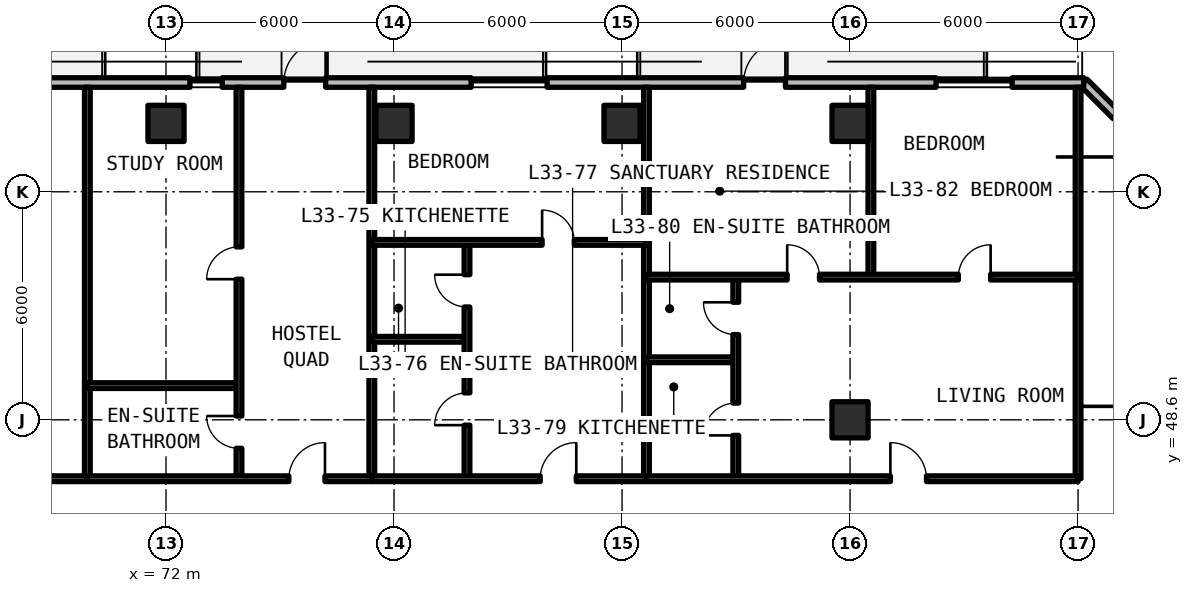
"""IFC4 building model, lengths in metres.
Left out: names, types, materials, properties, quantities, classifications, styles, units other than length and angle.
Written with IfcOpenShell. Run it as: python <this file> out.ifc"""

import sys

from ifc_helpers import new_model, si_unit, direction, frame, frame_2d, origin, origin_2d, place, context, subcontext, project, spatial, rectangle, extrude, element, fill, save


model = new_model("IFC4")
c1 = context("Model", 3, precision=1e-05, world=origin(), true_north=direction((0.0, 1.0)))
c2 = subcontext(c1, "Body", "Model", "MODEL_VIEW")
j1 = project(units=[si_unit("LENGTHUNIT", "METRE"), si_unit("PLANEANGLEUNIT", "RADIAN")], contexts=[c1])
p1 = place(None, origin())
s1 = spatial("IfcSite", under=j1, at=p1, CompositionType="ELEMENT")
p2 = place(p1, origin())
s2 = spatial("IfcBuilding", under=s1, at=p2, CompositionType="ELEMENT")
p3 = place(p2, frame((0.0, 0.0, 119.46)))
s3 = spatial("IfcBuildingStorey", under=s2, at=p3, CompositionType="ELEMENT", Elevation=119.46)
for number, where, z_axis, x_axis in (
    (1, (90.0, 48.6, 0.0), (0.0, 0.0, 1.0), (1.0, 0.0, 0.0)),
    (2, (72.0, 56.4, 0.0), (0.0, 0.0, 1.0), (1.0, 0.0, 0.0)),
    (3, (78.0, 56.4, 0.0), (0.0, 0.0, 1.0), (1.0, 0.0, 0.0)),
    (4, (84.0, 56.4, 0.0), (0.0, 0.0, 1.0), (1.0, 0.0, 0.0)),
    (5, (90.0, 56.4, 0.0), (0.0, 0.0, 1.0), (1.0, 0.0, 0.0)),
):
    element("IfcColumn", number, at=place(p3, frame(where, z_axis=z_axis, x_axis=x_axis)), inside=s3, PredefinedType="COLUMN", context=c2, shape_type="SweptSolid", body=[
        extrude(rectangle(XDim=0.95, YDim=0.95, at=origin_2d()), origin(), (0.0, 0.0, 1.0), 3.63),
    ])
p4 = place(p3, frame((100.275, 53.348, 0.0), z_axis=(0.0, 0.0, 1.0), x_axis=(-0.70708586489, 0.707127696864, 0.0)))
e6 = element("IfcWall", 6, at=p4, inside=s3, PredefinedType="SOLIDWALL", context=c2, shape_type="SweptSolid", body=[
    extrude(rectangle(XDim=5.836, YDim=0.25, at=frame_2d((2.918, 0.0))), origin(), (0.0, 0.0, 1.0), 3.35),
])
p5 = place(p4, frame((1.218, 0.0, 0.78)))
e7 = element("IfcOpeningElement", 7, at=p5, cuts=e6, PredefinedType="OPENING", context=c2, shape_type="SweptSolid", body=[
    extrude(rectangle(XDim=3.4, YDim=1.66, at=frame_2d((1.7, 0.83))), frame((0.0, 0.135, 0.0), z_axis=(0.0, -1.0, 0.0), x_axis=(1.0, 0.0, 0.0)), (0.0, 0.0, 1.0), 0.27),
])
p6 = place(p3, frame((96.148, 57.475, 0.0), z_axis=(0.0, 0.0, 1.0), x_axis=(-1.0, 0.0, 0.0)))
e8 = element("IfcWall", 8, at=p6, inside=s3, PredefinedType="SOLIDWALL", context=c2, shape_type="SweptSolid", body=[
    extrude(rectangle(XDim=44.023, YDim=0.25, at=frame_2d((22.012, 0.0))), origin(), (0.0, 0.0, 1.0), 3.35),
])
p7 = place(p6, frame((32.048, 0.0, 0.0)))
e9 = element("IfcOpeningElement", 9, at=p7, cuts=e8, PredefinedType="OPENING", context=c2, shape_type="SweptSolid", body=[
    extrude(rectangle(XDim=1.1, YDim=2.15, at=frame_2d((0.55, 1.075))), frame((0.0, 0.135, 0.0), z_axis=(0.0, -1.0, 0.0), x_axis=(1.0, 0.0, 0.0)), (0.0, 0.0, 1.0), 0.27),
])
p8 = place(p6, frame((19.948, 0.0, 0.0)))
e10 = element("IfcOpeningElement", 10, at=p8, cuts=e8, PredefinedType="OPENING", context=c2, shape_type="SweptSolid", body=[
    extrude(rectangle(XDim=1.1, YDim=2.15, at=frame_2d((0.55, 1.075))), frame((0.0, 0.135, 0.0), z_axis=(0.0, -1.0, 0.0), x_axis=(1.0, 0.0, 0.0)), (0.0, 0.0, 1.0), 0.27),
])
p9 = place(p6, frame((7.848, 0.0, 0.0)))
e11 = element("IfcOpeningElement", 11, at=p9, cuts=e8, PredefinedType="OPENING", context=c2, shape_type="SweptSolid", body=[
    extrude(rectangle(XDim=1.1, YDim=2.15, at=frame_2d((0.55, 1.075))), frame((0.0, 0.135, 0.0), z_axis=(0.0, -1.0, 0.0), x_axis=(1.0, 0.0, 0.0)), (0.0, 0.0, 1.0), 0.27),
])
p10 = place(p6, frame((38.769, 0.0, 0.78)))
e12 = element("IfcOpeningElement", 12, at=p10, cuts=e8, PredefinedType="OPENING", context=c2, shape_type="SweptSolid", body=[
    extrude(rectangle(XDim=2.0, YDim=1.66, at=frame_2d((1.0, 0.83))), frame((0.0, 0.135, 0.0), z_axis=(0.0, -1.0, 0.0), x_axis=(1.0, 0.0, 0.0)), (0.0, 0.0, 1.0), 0.27),
])
p11 = place(p6, frame((22.668, 0.0, 0.78)))
e13 = element("IfcOpeningElement", 13, at=p11, cuts=e8, PredefinedType="OPENING", context=c2, shape_type="SweptSolid", body=[
    extrude(rectangle(XDim=0.85, YDim=1.65, at=frame_2d((0.425, 0.825))), frame((0.0, 0.135, 0.0), z_axis=(0.0, -1.0, 0.0), x_axis=(1.0, 0.0, 0.0)), (0.0, 0.0, 1.0), 0.27),
])
p12 = place(p6, frame((14.119, 0.0, 0.78)))
e14 = element("IfcOpeningElement", 14, at=p12, cuts=e8, PredefinedType="OPENING", context=c2, shape_type="SweptSolid", body=[
    extrude(rectangle(XDim=2.0, YDim=1.66, at=frame_2d((1.0, 0.83))), frame((0.0, 0.135, 0.0), z_axis=(0.0, -1.0, 0.0), x_axis=(1.0, 0.0, 0.0)), (0.0, 0.0, 1.0), 0.27),
])
p13 = place(p6, frame((1.884, 0.0, 0.78)))
e15 = element("IfcOpeningElement", 15, at=p13, cuts=e8, PredefinedType="OPENING", context=c2, shape_type="SweptSolid", body=[
    extrude(rectangle(XDim=2.0, YDim=1.66, at=frame_2d((1.0, 0.83))), frame((0.0, 0.135, 0.0), z_axis=(0.0, -1.0, 0.0), x_axis=(1.0, 0.0, 0.0)), (0.0, 0.0, 1.0), 0.27),
])
for number, where, z_axis, x_axis in (
    (16, (96.0, 47.05, 0.0), (0.0, 0.0, 1.0), (0.0, 1.0, 0.0)),
    (17, (69.93, 47.05, 0.0), (0.0, 0.0, 1.0), (0.0, 1.0, 0.0)),
):
    element("IfcWall", number, at=place(p3, frame(where, z_axis=z_axis, x_axis=x_axis)), inside=s3, PredefinedType="SOLIDWALL", context=c2, shape_type="SweptSolid", body=[
        extrude(rectangle(XDim=10.3, YDim=0.15, at=frame_2d((5.15, 0.0))), origin(), (0.0, 0.0, 1.0), 2.57),
    ])
p14 = place(p3, frame((60.638, 47.05, 0.0), z_axis=(0.0, 0.0, 1.0), x_axis=(1.0, 0.0, 0.0)))
e18 = element("IfcWall", 18, at=p14, inside=s3, PredefinedType="SOLIDWALL", context=c2, shape_type="SweptSolid", body=[
    extrude(rectangle(XDim=9.292, YDim=0.15, at=frame_2d((4.646, 0.0))), origin(), (0.0, 0.0, 1.0), 2.57),
])
p15 = place(p14, frame((4.096, 0.0, 0.0)))
e19 = element("IfcOpeningElement", 19, at=p15, cuts=e18, PredefinedType="OPENING", context=c2, shape_type="SweptSolid", body=[
    extrude(rectangle(XDim=1.1, YDim=2.15, at=frame_2d((0.55, 1.075))), frame((0.0, 0.085, 0.0), z_axis=(0.0, -1.0, 0.0), x_axis=(1.0, 0.0, 0.0)), (0.0, 0.0, 1.0), 0.17),
])
p16 = place(p3, frame((77.416, 47.05, 0.0), z_axis=(0.0, 0.0, 1.0), x_axis=(0.0, 1.0, 0.0)))
e20 = element("IfcWall", 20, at=p16, inside=s3, PredefinedType="SOLIDWALL", context=c2, shape_type="SweptSolid", body=[
    extrude(rectangle(XDim=10.3, YDim=0.15, at=frame_2d((5.15, 0.0))), origin(), (0.0, 0.0, 1.0), 2.57),
])
p17 = place(p3, frame((69.93, 49.5, 0.0), z_axis=(0.0, 0.0, 1.0), x_axis=(1.0, 0.0, 0.0)))
e21 = element("IfcWall", 21, at=p17, inside=s3, PredefinedType="PARTITIONING", context=c2, shape_type="SweptSolid", body=[
    extrude(rectangle(XDim=3.99, YDim=0.15, at=frame_2d((1.995, 0.0))), origin(), (0.0, 0.0, 1.0), 2.57),
])
p18 = place(p3, frame((73.92, 47.05, 0.0), z_axis=(0.0, 0.0, 1.0), x_axis=(0.0, 1.0, 0.0)))
e22 = element("IfcWall", 22, at=p18, inside=s3, PredefinedType="PARTITIONING", context=c2, shape_type="SweptSolid", body=[
    extrude(rectangle(XDim=10.3, YDim=0.15, at=frame_2d((5.15, 0.0))), origin(), (0.0, 0.0, 1.0), 2.57),
])
p19 = place(p18, frame((0.8, 0.0, 0.0)))
e23 = element("IfcOpeningElement", 23, at=p19, cuts=e22, PredefinedType="OPENING", context=c2, shape_type="SweptSolid", body=[
    extrude(rectangle(XDim=0.85, YDim=2.1, at=frame_2d((0.425, 1.05))), frame((0.0, 0.085, 0.0), z_axis=(0.0, -1.0, 0.0), x_axis=(1.0, 0.0, 0.0)), (0.0, 0.0, 1.0), 0.17),
])
p20 = place(p18, frame((5.25, 0.0, 0.0)))
e24 = element("IfcOpeningElement", 24, at=p20, cuts=e22, PredefinedType="OPENING", context=c2, shape_type="SweptSolid", body=[
    extrude(rectangle(XDim=0.85, YDim=2.1, at=frame_2d((0.425, 1.05))), frame((0.0, 0.085, 0.0), z_axis=(0.0, -1.0, 0.0), x_axis=(1.0, 0.0, 0.0)), (0.0, 0.0, 1.0), 0.17),
])
p21 = place(p3, frame((69.93, 47.05, 0.0), z_axis=(0.0, 0.0, 1.0), x_axis=(1.0, 0.0, 0.0)))
e25 = element("IfcWall", 25, at=p21, inside=s3, PredefinedType="SOLIDWALL", context=c2, shape_type="SweptSolid", body=[
    extrude(rectangle(XDim=7.485, YDim=0.15, at=frame_2d((3.743, 0.0))), origin(), (0.0, 0.0, 1.0), 2.57),
])
p22 = place(p21, frame((5.302, 0.0, 0.0)))
e26 = element("IfcOpeningElement", 26, at=p22, cuts=e25, PredefinedType="OPENING", context=c2, shape_type="SweptSolid", body=[
    extrude(rectangle(XDim=0.95, YDim=2.15, at=frame_2d((0.475, 1.075))), frame((0.0, 0.085, 0.0), z_axis=(0.0, -1.0, 0.0), x_axis=(1.0, 0.0, 0.0)), (0.0, 0.0, 1.0), 0.17),
])
p23 = place(p3, frame((84.643, 47.05, 0.0), z_axis=(0.0, 0.0, 1.0), x_axis=(0.0, 1.0, 0.0)))
e27 = element("IfcWall", 27, at=p23, inside=s3, PredefinedType="SOLIDWALL", context=c2, shape_type="SweptSolid", body=[
    extrude(rectangle(XDim=10.3, YDim=0.15, at=frame_2d((5.15, 0.0))), origin(), (0.0, 0.0, 1.0), 2.57),
])
p24 = place(p3, frame((77.416, 50.719, 0.0), z_axis=(0.0, 0.0, 1.0), x_axis=(1.0, 0.0, 0.0)))
e28 = element("IfcWall", 28, at=p24, inside=s3, PredefinedType="PARTITIONING", context=c2, shape_type="SweptSolid", body=[
    extrude(rectangle(XDim=2.504, YDim=0.15, at=frame_2d((1.252, 0.0))), origin(), (0.0, 0.0, 1.0), 2.57),
])
p25 = place(p3, frame((79.92, 47.05, 0.0), z_axis=(0.0, 0.0, 1.0), x_axis=(0.0, 1.0, 0.0)))
e29 = element("IfcWall", 29, at=p25, inside=s3, PredefinedType="PARTITIONING", context=c2, shape_type="SweptSolid", body=[
    extrude(rectangle(XDim=6.218, YDim=0.15, at=frame_2d((3.109, 0.0))), origin(), (0.0, 0.0, 1.0), 2.57),
])
p26 = place(p25, frame((1.409, 0.0, 0.0)))
e30 = element("IfcOpeningElement", 30, at=p26, cuts=e29, PredefinedType="OPENING", context=c2, shape_type="SweptSolid", body=[
    extrude(rectangle(XDim=0.85, YDim=2.1, at=frame_2d((0.425, 1.05))), frame((0.0, 0.085, 0.0), z_axis=(0.0, -1.0, 0.0), x_axis=(1.0, 0.0, 0.0)), (0.0, 0.0, 1.0), 0.17),
])
p27 = place(p25, frame((4.519, 0.0, 0.0)))
e31 = element("IfcOpeningElement", 31, at=p27, cuts=e29, PredefinedType="OPENING", context=c2, shape_type="SweptSolid", body=[
    extrude(rectangle(XDim=0.85, YDim=2.1, at=frame_2d((0.425, 1.05))), frame((0.0, 0.085, 0.0), z_axis=(0.0, -1.0, 0.0), x_axis=(1.0, 0.0, 0.0)), (0.0, 0.0, 1.0), 0.17),
])
p28 = place(p3, frame((77.416, 53.268, 0.0), z_axis=(0.0, 0.0, 1.0), x_axis=(1.0, 0.0, 0.0)))
e32 = element("IfcWall", 32, at=p28, inside=s3, PredefinedType="PARTITIONING", context=c2, shape_type="SweptSolid", body=[
    extrude(rectangle(XDim=7.227, YDim=0.15, at=frame_2d((3.614, 0.0))), origin(), (0.0, 0.0, 1.0), 2.57),
])
p29 = place(p28, frame((4.481, 0.0, 0.0)))
e33 = element("IfcOpeningElement", 33, at=p29, cuts=e32, PredefinedType="OPENING", context=c2, shape_type="SweptSolid", body=[
    extrude(rectangle(XDim=0.85, YDim=2.1, at=frame_2d((0.425, 1.05))), frame((0.0, 0.085, 0.0), z_axis=(0.0, -1.0, 0.0), x_axis=(1.0, 0.0, 0.0)), (0.0, 0.0, 1.0), 0.17),
])
p30 = place(p3, frame((77.416, 47.05, 0.0), z_axis=(0.0, 0.0, 1.0), x_axis=(1.0, 0.0, 0.0)))
e34 = element("IfcWall", 34, at=p30, inside=s3, PredefinedType="SOLIDWALL", context=c2, shape_type="SweptSolid", body=[
    extrude(rectangle(XDim=7.227, YDim=0.15, at=frame_2d((3.614, 0.0))), origin(), (0.0, 0.0, 1.0), 2.57),
])
p31 = place(p30, frame((4.431, 0.0, 0.0)))
e35 = element("IfcOpeningElement", 35, at=p31, cuts=e34, PredefinedType="OPENING", context=c2, shape_type="SweptSolid", body=[
    extrude(rectangle(XDim=0.95, YDim=2.15, at=frame_2d((0.475, 1.075))), frame((0.0, 0.085, 0.0), z_axis=(0.0, -1.0, 0.0), x_axis=(1.0, 0.0, 0.0)), (0.0, 0.0, 1.0), 0.17),
])
p32 = place(p3, frame((84.643, 50.18, 0.0), z_axis=(0.0, 0.0, 1.0), x_axis=(1.0, 0.0, 0.0)))
e36 = element("IfcWall", 36, at=p32, inside=s3, PredefinedType="PARTITIONING", context=c2, shape_type="SweptSolid", body=[
    extrude(rectangle(XDim=2.35, YDim=0.15, at=frame_2d((1.175, 0.0))), origin(), (0.0, 0.0, 1.0), 2.57),
])
p33 = place(p3, frame((86.993, 47.05, 0.0), z_axis=(0.0, 0.0, 1.0), x_axis=(0.0, 1.0, 0.0)))
e37 = element("IfcWall", 37, at=p33, inside=s3, PredefinedType="PARTITIONING", context=c2, shape_type="SweptSolid", body=[
    extrude(rectangle(XDim=5.305, YDim=0.15, at=frame_2d((2.652, 0.0))), origin(), (0.0, 0.0, 1.0), 2.57),
])
p34 = place(p33, frame((1.14, 0.0, 0.0)))
e38 = element("IfcOpeningElement", 38, at=p34, cuts=e37, PredefinedType="OPENING", context=c2, shape_type="SweptSolid", body=[
    extrude(rectangle(XDim=0.85, YDim=2.1, at=frame_2d((0.425, 1.05))), frame((0.0, 0.085, 0.0), z_axis=(0.0, -1.0, 0.0), x_axis=(1.0, 0.0, 0.0)), (0.0, 0.0, 1.0), 0.17),
])
p35 = place(p33, frame((3.792, 0.0, 0.0)))
e39 = element("IfcOpeningElement", 39, at=p35, cuts=e37, PredefinedType="OPENING", context=c2, shape_type="SweptSolid", body=[
    extrude(rectangle(XDim=0.85, YDim=2.1, at=frame_2d((0.425, 1.05))), frame((0.0, 0.085, 0.0), z_axis=(0.0, -1.0, 0.0), x_axis=(1.0, 0.0, 0.0)), (0.0, 0.0, 1.0), 0.17),
])
p36 = place(p3, frame((90.549, 52.355, 0.0), z_axis=(0.0, 0.0, 1.0), x_axis=(0.0, 1.0, 0.0)))
e40 = element("IfcWall", 40, at=p36, inside=s3, PredefinedType="PARTITIONING", context=c2, shape_type="SweptSolid", body=[
    extrude(rectangle(XDim=4.995, YDim=0.15, at=frame_2d((2.498, 0.0))), origin(), (0.0, 0.0, 1.0), 2.57),
])
p37 = place(p3, frame((84.643, 52.355, 0.0), z_axis=(0.0, 0.0, 1.0), x_axis=(1.0, 0.0, 0.0)))
e41 = element("IfcWall", 41, at=p37, inside=s3, PredefinedType="PARTITIONING", context=c2, shape_type="SweptSolid", body=[
    extrude(rectangle(XDim=11.357, YDim=0.15, at=frame_2d((5.679, 0.0))), origin(), (0.0, 0.0, 1.0), 2.57),
])
p38 = place(p37, frame((3.703, 0.0, 0.0)))
e42 = element("IfcOpeningElement", 42, at=p38, cuts=e41, PredefinedType="OPENING", context=c2, shape_type="SweptSolid", body=[
    extrude(rectangle(XDim=0.85, YDim=2.1, at=frame_2d((0.425, 1.05))), frame((0.0, 0.085, 0.0), z_axis=(0.0, -1.0, 0.0), x_axis=(1.0, 0.0, 0.0)), (0.0, 0.0, 1.0), 0.17),
])
p39 = place(p37, frame((8.207, 0.0, 0.0)))
e43 = element("IfcOpeningElement", 43, at=p39, cuts=e41, PredefinedType="OPENING", context=c2, shape_type="SweptSolid", body=[
    extrude(rectangle(XDim=0.85, YDim=2.1, at=frame_2d((0.425, 1.05))), frame((0.0, 0.085, 0.0), z_axis=(0.0, -1.0, 0.0), x_axis=(1.0, 0.0, 0.0)), (0.0, 0.0, 1.0), 0.17),
])
p40 = place(p3, frame((84.643, 47.05, 0.0), z_axis=(0.0, 0.0, 1.0), x_axis=(1.0, 0.0, 0.0)))
e44 = element("IfcWall", 44, at=p40, inside=s3, PredefinedType="SOLIDWALL", context=c2, shape_type="SweptSolid", body=[
    extrude(rectangle(XDim=11.357, YDim=0.15, at=frame_2d((5.679, 0.0))), origin(), (0.0, 0.0, 1.0), 2.57),
])
p41 = place(p40, frame((6.419, 0.0, 0.0)))
e45 = element("IfcOpeningElement", 45, at=p41, cuts=e44, PredefinedType="OPENING", context=c2, shape_type="SweptSolid", body=[
    extrude(rectangle(XDim=0.95, YDim=2.15, at=frame_2d((0.475, 1.075))), frame((0.0, 0.085, 0.0), z_axis=(0.0, -1.0, 0.0), x_axis=(1.0, 0.0, 0.0)), (0.0, 0.0, 1.0), 0.17),
])
p42 = place(p8, frame((1.1, 0.0, 0.0), z_axis=(0.0, 0.0, 1.0), x_axis=(-1.0, 0.0, 0.0)))
e46 = element("IfcDoor", 46, at=p42, inside=s3, OperationType="SINGLE_SWING_LEFT", PredefinedType="DOOR", context=c2, shape_type="SweptSolid", body=[
    extrude(rectangle(XDim=1.1, YDim=2.15, at=frame_2d((0.55, 1.075))), frame((0.0, 0.025, 0.0), z_axis=(0.0, -1.0, 0.0), x_axis=(1.0, 0.0, 0.0)), (0.0, 0.0, 1.0), 0.05),
])
fill(e10, e46)
p43 = place(p9, frame((1.1, 0.0, 0.0), z_axis=(0.0, 0.0, 1.0), x_axis=(-1.0, 0.0, 0.0)))
e47 = element("IfcDoor", 47, at=p43, inside=s3, OperationType="SINGLE_SWING_RIGHT", PredefinedType="DOOR", context=c2, shape_type="SweptSolid", body=[
    extrude(rectangle(XDim=1.1, YDim=2.15, at=frame_2d((0.55, 1.075))), frame((0.0, 0.025, 0.0), z_axis=(0.0, -1.0, 0.0), x_axis=(1.0, 0.0, 0.0)), (0.0, 0.0, 1.0), 0.05),
])
fill(e11, e47)
p44 = place(p11, origin())
e48 = element("IfcWindow", 48, at=p44, inside=s3, PartitioningType="SINGLE_PANEL", PredefinedType="WINDOW", context=c2, shape_type="SweptSolid", body=[
    extrude(rectangle(XDim=0.85, YDim=1.65, at=frame_2d((0.425, 0.825))), frame((0.0, 0.03, 0.0), z_axis=(0.0, -1.0, 0.0), x_axis=(1.0, 0.0, 0.0)), (0.0, 0.0, 1.0), 0.06),
])
fill(e13, e48)
p45 = place(p12, origin())
e49 = element("IfcWindow", 49, at=p45, inside=s3, PartitioningType="SINGLE_PANEL", PredefinedType="WINDOW", context=c2, shape_type="SweptSolid", body=[
    extrude(rectangle(XDim=2.0, YDim=1.66, at=frame_2d((1.0, 0.83))), frame((0.0, 0.03, 0.0), z_axis=(0.0, -1.0, 0.0), x_axis=(1.0, 0.0, 0.0)), (0.0, 0.0, 1.0), 0.06),
])
fill(e14, e49)
p46 = place(p13, origin())
e50 = element("IfcWindow", 50, at=p46, inside=s3, PartitioningType="SINGLE_PANEL", PredefinedType="WINDOW", context=c2, shape_type="SweptSolid", body=[
    extrude(rectangle(XDim=2.0, YDim=1.66, at=frame_2d((1.0, 0.83))), frame((0.0, 0.03, 0.0), z_axis=(0.0, -1.0, 0.0), x_axis=(1.0, 0.0, 0.0)), (0.0, 0.0, 1.0), 0.06),
])
fill(e15, e50)
p47 = place(p19, origin())
e51 = element("IfcDoor", 51, at=p47, inside=s3, OperationType="SINGLE_SWING_RIGHT", PredefinedType="DOOR", context=c2, shape_type="SweptSolid", body=[
    extrude(rectangle(XDim=0.85, YDim=2.1, at=frame_2d((0.425, 1.05))), frame((0.0, 0.025, 0.0), z_axis=(0.0, -1.0, 0.0), x_axis=(1.0, 0.0, 0.0)), (0.0, 0.0, 1.0), 0.05),
])
fill(e23, e51)
p48 = place(p20, origin())
e52 = element("IfcDoor", 52, at=p48, inside=s3, OperationType="SINGLE_SWING_LEFT", PredefinedType="DOOR", context=c2, shape_type="SweptSolid", body=[
    extrude(rectangle(XDim=0.85, YDim=2.1, at=frame_2d((0.425, 1.05))), frame((0.0, 0.025, 0.0), z_axis=(0.0, -1.0, 0.0), x_axis=(1.0, 0.0, 0.0)), (0.0, 0.0, 1.0), 0.05),
])
fill(e24, e52)
p49 = place(p22, origin())
e53 = element("IfcDoor", 53, at=p49, inside=s3, OperationType="SINGLE_SWING_RIGHT", PredefinedType="DOOR", context=c2, shape_type="SweptSolid", body=[
    extrude(rectangle(XDim=0.95, YDim=2.15, at=frame_2d((0.475, 1.075))), frame((0.0, 0.025, 0.0), z_axis=(0.0, -1.0, 0.0), x_axis=(1.0, 0.0, 0.0)), (0.0, 0.0, 1.0), 0.05),
])
fill(e26, e53)
p50 = place(p26, origin())
e54 = element("IfcDoor", 54, at=p50, inside=s3, OperationType="SINGLE_SWING_LEFT", PredefinedType="DOOR", context=c2, shape_type="SweptSolid", body=[
    extrude(rectangle(XDim=0.85, YDim=2.1, at=frame_2d((0.425, 1.05))), frame((0.0, 0.025, 0.0), z_axis=(0.0, -1.0, 0.0), x_axis=(1.0, 0.0, 0.0)), (0.0, 0.0, 1.0), 0.05),
])
fill(e30, e54)
p51 = place(p27, origin())
e55 = element("IfcDoor", 55, at=p51, inside=s3, OperationType="SINGLE_SWING_RIGHT", PredefinedType="DOOR", context=c2, shape_type="SweptSolid", body=[
    extrude(rectangle(XDim=0.85, YDim=2.1, at=frame_2d((0.425, 1.05))), frame((0.0, 0.025, 0.0), z_axis=(0.0, -1.0, 0.0), x_axis=(1.0, 0.0, 0.0)), (0.0, 0.0, 1.0), 0.05),
])
fill(e31, e55)
p52 = place(p29, origin())
e56 = element("IfcDoor", 56, at=p52, inside=s3, OperationType="SINGLE_SWING_LEFT", PredefinedType="DOOR", context=c2, shape_type="SweptSolid", body=[
    extrude(rectangle(XDim=0.85, YDim=2.1, at=frame_2d((0.425, 1.05))), frame((0.0, 0.025, 0.0), z_axis=(0.0, -1.0, 0.0), x_axis=(1.0, 0.0, 0.0)), (0.0, 0.0, 1.0), 0.05),
])
fill(e33, e56)
p53 = place(p31, origin())
e57 = element("IfcDoor", 57, at=p53, inside=s3, OperationType="SINGLE_SWING_RIGHT", PredefinedType="DOOR", context=c2, shape_type="SweptSolid", body=[
    extrude(rectangle(XDim=0.95, YDim=2.15, at=frame_2d((0.475, 1.075))), frame((0.0, 0.025, 0.0), z_axis=(0.0, -1.0, 0.0), x_axis=(1.0, 0.0, 0.0)), (0.0, 0.0, 1.0), 0.05),
])
fill(e35, e57)
p54 = place(p34, origin())
e58 = element("IfcDoor", 58, at=p54, inside=s3, OperationType="SINGLE_SWING_LEFT", PredefinedType="DOOR", context=c2, shape_type="SweptSolid", body=[
    extrude(rectangle(XDim=0.85, YDim=2.1, at=frame_2d((0.425, 1.05))), frame((0.0, 0.025, 0.0), z_axis=(0.0, -1.0, 0.0), x_axis=(1.0, 0.0, 0.0)), (0.0, 0.0, 1.0), 0.05),
])
fill(e38, e58)
p55 = place(p35, origin())
e59 = element("IfcDoor", 59, at=p55, inside=s3, OperationType="SINGLE_SWING_RIGHT", PredefinedType="DOOR", context=c2, shape_type="SweptSolid", body=[
    extrude(rectangle(XDim=0.85, YDim=2.1, at=frame_2d((0.425, 1.05))), frame((0.0, 0.025, 0.0), z_axis=(0.0, -1.0, 0.0), x_axis=(1.0, 0.0, 0.0)), (0.0, 0.0, 1.0), 0.05),
])
fill(e39, e59)
p56 = place(p38, origin())
e60 = element("IfcDoor", 60, at=p56, inside=s3, OperationType="SINGLE_SWING_LEFT", PredefinedType="DOOR", context=c2, shape_type="SweptSolid", body=[
    extrude(rectangle(XDim=0.85, YDim=2.1, at=frame_2d((0.425, 1.05))), frame((0.0, 0.025, 0.0), z_axis=(0.0, -1.0, 0.0), x_axis=(1.0, 0.0, 0.0)), (0.0, 0.0, 1.0), 0.05),
])
fill(e42, e60)
p57 = place(p39, origin())
e61 = element("IfcDoor", 61, at=p57, inside=s3, OperationType="SINGLE_SWING_RIGHT", PredefinedType="DOOR", context=c2, shape_type="SweptSolid", body=[
    extrude(rectangle(XDim=0.85, YDim=2.1, at=frame_2d((0.425, 1.05))), frame((0.0, 0.025, 0.0), z_axis=(0.0, -1.0, 0.0), x_axis=(1.0, 0.0, 0.0)), (0.0, 0.0, 1.0), 0.05),
])
fill(e43, e61)
p58 = place(p41, origin())
e62 = element("IfcDoor", 62, at=p58, inside=s3, OperationType="SINGLE_SWING_LEFT", PredefinedType="DOOR", context=c2, shape_type="SweptSolid", body=[
    extrude(rectangle(XDim=0.95, YDim=2.15, at=frame_2d((0.475, 1.075))), frame((0.0, 0.025, 0.0), z_axis=(0.0, -1.0, 0.0), x_axis=(1.0, 0.0, 0.0)), (0.0, 0.0, 1.0), 0.05),
])
fill(e45, e62)
save(model, sys.argv[1])
